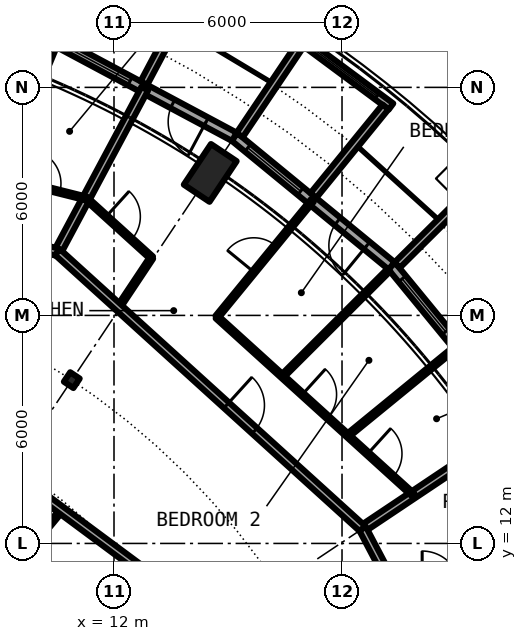
"""IFC4 building model, lengths in metres.
Left out: names, types, materials, properties, quantities, classifications, styles, units other than length and angle.
Written with IfcOpenShell. Run it as: python <this file> out.ifc"""

import sys

from ifc_helpers import new_model, si_unit, direction, frame, frame_2d, origin, origin_2d, place, context, subcontext, project, spatial, rectangle, circle, hollow_circle, i_section, extrude, element, fill, save


model = new_model("IFC4")
c1 = context("Model", 3, precision=1e-05, world=origin(), true_north=direction((0.0, 1.0)))
c2 = subcontext(c1, "Body", "Model", "MODEL_VIEW")
j1 = project(units=[si_unit("LENGTHUNIT", "METRE"), si_unit("PLANEANGLEUNIT", "RADIAN")], contexts=[c1])
p1 = place(None, origin())
s1 = spatial("IfcSite", under=j1, at=p1, CompositionType="ELEMENT")
p2 = place(p1, origin())
s2 = spatial("IfcBuilding", under=s1, at=p2, CompositionType="ELEMENT")
p3 = place(p2, frame((0.0, 0.0, 234.05)))
s3 = spatial("IfcBuildingStorey", under=s2, at=p3, CompositionType="ELEMENT", Elevation=234.05)
p4 = place(p3, frame((14.889, 22.283, 0.0), z_axis=(-0.231777820067, -0.346913947437, 0.908806775502), x_axis=(0.831494710184, -0.555532669549, 0.0)))
e1 = element("IfcColumn", 1, at=p4, inside=s3, PredefinedType="COLUMN", context=c2, shape_type="SweptSolid", body=[
    extrude(hollow_circle(Radius=0.406, WallThickness=0.03, at=origin_2d()), origin(), (0.0, 0.0, 1.0), 3.081),
])
p5 = place(p3, frame((10.889, 16.297, 0.0), z_axis=(0.0, 0.0, 1.0), x_axis=(0.55557023302, 0.831469612303, 0.0)))
e2 = element("IfcColumn", 2, at=p5, inside=s3, PredefinedType="COLUMN", context=c2, shape_type="SweptSolid", body=[
    extrude(i_section(OverallWidth=0.3, OverallDepth=0.3, WebThickness=0.011, FlangeThickness=0.019, FilletRadius=0.027, at=origin_2d()), origin(), (0.0, 0.0, 1.0), 3.05),
])
p6 = place(p3, frame((22.699, 15.167, 0.0), z_axis=(0.0, 0.0, 1.0), x_axis=(-0.634382322723, 0.773019449054, 0.0)))
e3 = element("IfcWall", 3, at=p6, inside=s3, PredefinedType="SOLIDWALL", context=c2, shape_type="SweptSolid", body=[
    extrude(rectangle(XDim=5.352, YDim=0.25, at=frame_2d((2.676, 0.0))), origin(), (0.0, 0.0, 1.0), 2.7),
])
p7 = place(p6, frame((0.841, 0.0, 0.0)))
e4 = element("IfcOpeningElement", 4, at=p7, cuts=e3, PredefinedType="OPENING", context=c2, shape_type="SweptSolid", body=[
    extrude(rectangle(XDim=1.0, YDim=2.2, at=frame_2d((0.5, 1.1))), frame((0.0, 0.135, 0.0), z_axis=(0.0, -1.0, 0.0), x_axis=(1.0, 0.0, 0.0)), (0.0, 0.0, 1.0), 0.27),
])
p8 = place(p6, frame((3.111, 0.0, 0.3)))
e5 = element("IfcOpeningElement", 5, at=p8, cuts=e3, PredefinedType="OPENING", context=c2, shape_type="SweptSolid", body=[
    extrude(rectangle(XDim=1.8, YDim=2.1, at=frame_2d((0.9, 1.05))), frame((0.0, 0.135, 0.0), z_axis=(0.0, -1.0, 0.0), x_axis=(1.0, 0.0, 0.0)), (0.0, 0.0, 1.0), 0.27),
])
p9 = place(p3, frame((19.45, 19.323, -0.03), z_axis=(0.0, 0.0, 1.0), x_axis=(0.709727076896, 0.704476739375, 0.0)))
e6 = element("IfcWall", 6, at=p9, inside=s3, PredefinedType="SOLIDWALL", context=c2, shape_type="SweptSolid", body=[
    extrude(rectangle(XDim=2.883, YDim=0.2, at=frame_2d((1.441, 0.0))), origin(), (0.0, 0.0, 1.0), 2.73),
])
p10 = place(p3, frame((19.304, 19.304, 0.0), z_axis=(0.0, 0.0, 1.0), x_axis=(-0.773019449054, 0.634382322723, 0.0)))
e7 = element("IfcWall", 7, at=p10, inside=s3, PredefinedType="SOLIDWALL", context=c2, shape_type="SweptSolid", body=[
    extrude(rectangle(XDim=5.352, YDim=0.25, at=frame_2d((2.676, 0.0))), origin(), (0.0, 0.0, 1.0), 2.7),
])
p11 = place(p10, frame((0.841, 0.0, 0.0)))
e8 = element("IfcOpeningElement", 8, at=p11, cuts=e7, PredefinedType="OPENING", context=c2, shape_type="SweptSolid", body=[
    extrude(rectangle(XDim=1.0, YDim=2.2, at=frame_2d((0.5, 1.1))), frame((0.0, 0.135, 0.0), z_axis=(0.0, -1.0, 0.0), x_axis=(1.0, 0.0, 0.0)), (0.0, 0.0, 1.0), 0.27),
])
p12 = place(p10, frame((3.096, 0.0, 0.3)))
e9 = element("IfcOpeningElement", 9, at=p12, cuts=e7, PredefinedType="OPENING", context=c2, shape_type="SweptSolid", body=[
    extrude(rectangle(XDim=1.8, YDim=2.1, at=frame_2d((0.9, 1.05))), frame((0.0, 0.135, 0.0), z_axis=(0.0, -1.0, 0.0), x_axis=(1.0, 0.0, 0.0)), (0.0, 0.0, 1.0), 0.27),
])
p13 = place(p3, frame((19.289, 23.496, -0.03), z_axis=(0.0, 0.0, 1.0), x_axis=(-0.803052706508, 0.595908005124, 0.0)))
e10 = element("IfcWall", 10, at=p13, inside=s3, PredefinedType="SOLIDWALL", context=c2, shape_type="SweptSolid", body=[
    extrude(rectangle(XDim=2.994, YDim=0.2, at=frame_2d((1.497, 0.0))), origin(), (0.0, 0.0, 1.0), 2.73),
])
p14 = place(p13, frame((0.457, 0.0, 0.33)))
e11 = element("IfcOpeningElement", 11, at=p14, cuts=e10, PredefinedType="OPENING", context=c2, shape_type="SweptSolid", body=[
    extrude(circle(Radius=1.04, at=frame_2d((1.04, 1.04))), frame((0.0, 0.11, 0.0), z_axis=(0.0, -1.0, 0.0), x_axis=(1.0, 0.0, 0.0)), (0.0, 0.0, 1.0), 0.22),
])
p15 = place(p3, frame((17.246, 21.155, -0.03), z_axis=(0.0, 0.0, 1.0), x_axis=(0.631546363729, 0.775338113639, 0.0)))
e12 = element("IfcWall", 12, at=p15, inside=s3, PredefinedType="SOLIDWALL", context=c2, shape_type="SweptSolid", body=[
    extrude(rectangle(XDim=3.005, YDim=0.2, at=frame_2d((1.502, 0.0))), origin(), (0.0, 0.0, 1.0), 2.73),
])
p16 = place(p3, frame((15.307, 22.746, -0.03), z_axis=(0.0, 0.0, 1.0), x_axis=(0.558583730979, 0.829448139117, 0.0)))
e13 = element("IfcWall", 13, at=p16, inside=s3, PredefinedType="SOLIDWALL", context=c2, shape_type="SweptSolid", body=[
    extrude(rectangle(XDim=2.883, YDim=0.2, at=frame_2d((1.441, 0.0))), origin(), (0.0, 0.0, 1.0), 2.73),
])
p17 = place(p3, frame((15.167, 22.699, 0.0), z_axis=(0.0, 0.0, 1.0), x_axis=(-0.881915646801, 0.471407246368, 0.0)))
e14 = element("IfcWall", 14, at=p17, inside=s3, PredefinedType="SOLIDWALL", context=c2, shape_type="SweptSolid", body=[
    extrude(rectangle(XDim=5.352, YDim=0.25, at=frame_2d((2.676, 0.0))), origin(), (0.0, 0.0, 1.0), 2.7),
])
p18 = place(p17, frame((0.841, 0.0, 0.0)))
e15 = element("IfcOpeningElement", 15, at=p18, cuts=e14, PredefinedType="OPENING", context=c2, shape_type="SweptSolid", body=[
    extrude(rectangle(XDim=1.0, YDim=2.2, at=frame_2d((0.5, 1.1))), frame((0.0, 0.135, 0.0), z_axis=(0.0, -1.0, 0.0), x_axis=(1.0, 0.0, 0.0)), (0.0, 0.0, 1.0), 0.27),
])
p19 = place(p17, frame((3.111, 0.0, 0.3)))
e16 = element("IfcOpeningElement", 16, at=p19, cuts=e14, PredefinedType="OPENING", context=c2, shape_type="SweptSolid", body=[
    extrude(rectangle(XDim=1.8, YDim=2.1, at=frame_2d((0.9, 1.05))), frame((0.0, 0.135, 0.0), z_axis=(0.0, -1.0, 0.0), x_axis=(1.0, 0.0, 0.0)), (0.0, 0.0, 1.0), 0.27),
])
p20 = place(p3, frame((12.787, 24.113, -0.03), z_axis=(0.0, 0.0, 1.0), x_axis=(0.468365282436, 0.883534924159, 0.0)))
e17 = element("IfcWall", 17, at=p20, inside=s3, PredefinedType="SOLIDWALL", context=c2, shape_type="SweptSolid", body=[
    extrude(rectangle(XDim=3.006, YDim=0.2, at=frame_2d((1.503, 0.0))), origin(), (0.0, 0.0, 1.0), 2.73),
])
p21 = place(p3, frame((4.912, 5.955, 0.0), z_axis=(0.0, 0.0, 1.0), x_axis=(0.636045954217, 0.771651180342, 0.0)))
e18 = element("IfcWall", 18, at=p21, inside=s3, PredefinedType="PARTITIONING", context=c2, shape_type="SweptSolid", body=[
    extrude(rectangle(XDim=8.968, YDim=0.1, at=frame_2d((4.484, 0.0))), origin(), (0.0, 0.0, 1.0), 2.7),
])
p22 = place(p21, frame((6.401, 0.0, 0.0)))
e19 = element("IfcOpeningElement", 19, at=p22, cuts=e18, PredefinedType="OPENING", context=c2, shape_type="SweptSolid", body=[
    extrude(rectangle(XDim=0.9, YDim=2.3, at=frame_2d((0.45, 1.15))), frame((0.0, 0.06, 0.0), z_axis=(0.0, -1.0, 0.0), x_axis=(1.0, 0.0, 0.0)), (0.0, 0.0, 1.0), 0.12),
])
p23 = place(p21, frame((1.917, 0.0, 0.0)))
e20 = element("IfcOpeningElement", 20, at=p23, cuts=e18, PredefinedType="OPENING", context=c2, shape_type="SweptSolid", body=[
    extrude(rectangle(XDim=0.9, YDim=2.3, at=frame_2d((0.45, 1.15))), frame((0.0, 0.06, 0.0), z_axis=(0.0, -1.0, 0.0), x_axis=(1.0, 0.0, 0.0)), (0.0, 0.0, 1.0), 0.12),
])
p24 = place(p3, frame((9.013, 21.642, 0.0), z_axis=(0.0, 0.0, 1.0), x_axis=(0.384420204655, 0.923158223845, 0.0)))
e21 = element("IfcWall", 21, at=p24, inside=s3, PredefinedType="PARTITIONING", context=c2, shape_type="SweptSolid", body=[
    extrude(rectangle(XDim=3.73, YDim=0.1, at=frame_2d((1.865, 0.0))), origin(), (0.0, 0.0, 1.0), 2.7),
])
p25 = place(p3, frame((10.512, 19.667, 0.0), z_axis=(0.0, 0.0, 1.0), x_axis=(0.471271812246, 0.881988026553, 0.0)))
e22 = element("IfcWall", 22, at=p25, inside=s3, PredefinedType="PARTITIONING", context=c2, shape_type="SweptSolid", body=[
    extrude(rectangle(XDim=4.874, YDim=0.2, at=frame_2d((2.437, 0.0))), origin(), (0.0, 0.0, 1.0), 2.7),
])
p26 = place(p3, frame((12.118, 18.211, 0.0), z_axis=(0.0, 0.0, 1.0), x_axis=(0.554125989098, 0.832432813028, 0.0)))
e23 = element("IfcWall", 23, at=p26, inside=s3, PredefinedType="PARTITIONING", context=c2, shape_type="SweptSolid", body=[
    extrude(rectangle(XDim=1.57, YDim=0.1, at=frame_2d((0.785, 0.0))), origin(), (0.0, 0.0, 1.0), 2.7),
])
p27 = place(p3, frame((14.709, 17.958, 0.0), z_axis=(0.0, 0.0, 1.0), x_axis=(0.633590098448, 0.773668913133, 0.0)))
e24 = element("IfcWall", 24, at=p27, inside=s3, PredefinedType="PARTITIONING", context=c2, shape_type="SweptSolid", body=[
    extrude(rectangle(XDim=3.962, YDim=0.1, at=frame_2d((1.981, 0.0))), origin(), (0.0, 0.0, 1.0), 2.7),
])
p28 = place(p27, frame((1.531, 0.0, 0.0)))
e25 = element("IfcOpeningElement", 25, at=p28, cuts=e24, PredefinedType="OPENING", context=c2, shape_type="SweptSolid", body=[
    extrude(rectangle(XDim=0.9, YDim=2.3, at=frame_2d((0.45, 1.15))), frame((0.0, 0.06, 0.0), z_axis=(0.0, -1.0, 0.0), x_axis=(1.0, 0.0, 0.0)), (0.0, 0.0, 1.0), 0.12),
])
p29 = place(p3, frame((16.43, 16.398, 0.0), z_axis=(0.0, 0.0, 1.0), x_axis=(0.707722727509, 0.706490297858, 0.0)))
e26 = element("IfcWall", 26, at=p29, inside=s3, PredefinedType="PARTITIONING", context=c2, shape_type="SweptSolid", body=[
    extrude(rectangle(XDim=3.962, YDim=0.1, at=frame_2d((1.981, 0.0))), origin(), (0.0, 0.0, 1.0), 2.7),
])
p30 = place(p3, frame((18.151, 14.838, 0.0), z_axis=(0.0, 0.0, 1.0), x_axis=(0.774321581607, 0.63279229472, 0.0)))
e27 = element("IfcWall", 27, at=p30, inside=s3, PredefinedType="PARTITIONING", context=c2, shape_type="SweptSolid", body=[
    extrude(rectangle(XDim=3.731, YDim=0.1, at=frame_2d((1.866, 0.0))), origin(), (0.0, 0.0, 1.0), 2.7),
])
p31 = place(p3, frame((18.542, 12.389, 0.0), z_axis=(0.0, 0.0, 1.0), x_axis=(0.831340764735, 0.555763018642, 0.0)))
e28 = element("IfcWall", 28, at=p31, inside=s3, PredefinedType="PARTITIONING", context=c2, shape_type="SweptSolid", body=[
    extrude(rectangle(XDim=3.073, YDim=0.2, at=frame_2d((1.537, 0.0))), origin(), (0.0, 0.0, 1.0), 2.7),
])
p32 = place(p3, frame((5.137, 16.938, 0.0), z_axis=(0.0, 0.0, 1.0), x_axis=(0.803229232922, -0.595670042371, 0.0)))
e29 = element("IfcWall", 29, at=p32, inside=s3, PredefinedType="PARTITIONING", context=c2, shape_type="SweptSolid", body=[
    extrude(rectangle(XDim=10.224, YDim=0.2, at=frame_2d((5.112, 0.0))), origin(), (0.0, 0.0, 1.0), 2.7),
])
p33 = place(p32, frame((4.612, 0.0, 0.0)))
e30 = element("IfcOpeningElement", 30, at=p33, cuts=e29, PredefinedType="OPENING", context=c2, shape_type="SweptSolid", body=[
    extrude(rectangle(XDim=1.0, YDim=2.3, at=frame_2d((0.5, 1.15))), frame((0.0, 0.11, 0.0), z_axis=(0.0, -1.0, 0.0), x_axis=(1.0, 0.0, 0.0)), (0.0, 0.0, 1.0), 0.22),
])
p34 = place(p3, frame((0.0, 22.3, 0.0), z_axis=(0.0, 0.0, 1.0), x_axis=(0.969975381822, -0.243203122222, 0.0)))
e31 = element("IfcWall", 31, at=p34, inside=s3, PredefinedType="PARTITIONING", context=c2, shape_type="SweptSolid", body=[
    extrude(rectangle(XDim=10.843, YDim=0.2, at=frame_2d((5.421, 0.0))), origin(), (0.0, 0.0, 1.0), 2.7),
])
p35 = place(p34, frame((6.002, 0.0, 0.0)))
e32 = element("IfcOpeningElement", 32, at=p35, cuts=e31, PredefinedType="OPENING", context=c2, shape_type="SweptSolid", body=[
    extrude(rectangle(XDim=1.0, YDim=2.3, at=frame_2d((0.5, 1.15))), frame((0.0, 0.11, 0.0), z_axis=(0.0, -1.0, 0.0), x_axis=(1.0, 0.0, 0.0)), (0.0, 0.0, 1.0), 0.22),
])
p36 = place(p3, frame((10.512, 19.667, 0.0), z_axis=(0.0, 0.0, 1.0), x_axis=(0.740849323054, -0.67167125927, 0.0)))
e33 = element("IfcWall", 33, at=p36, inside=s3, PredefinedType="PARTITIONING", context=c2, shape_type="SweptSolid", body=[
    extrude(rectangle(XDim=10.842, YDim=0.2, at=frame_2d((5.421, 0.0))), origin(), (0.0, 0.0, 1.0), 2.7),
])
p37 = place(p36, frame((6.003, 0.0, 0.0)))
e34 = element("IfcOpeningElement", 34, at=p37, cuts=e33, PredefinedType="OPENING", context=c2, shape_type="SweptSolid", body=[
    extrude(rectangle(XDim=1.0, YDim=2.3, at=frame_2d((0.5, 1.15))), frame((0.0, 0.11, 0.0), z_axis=(0.0, -1.0, 0.0), x_axis=(1.0, 0.0, 0.0)), (0.0, 0.0, 1.0), 0.22),
])
p38 = place(p3, frame((18.542, 12.389, 0.0), z_axis=(0.0, 0.0, 1.0), x_axis=(0.465812036273, -0.88488369115, 0.0)))
e35 = element("IfcWall", 35, at=p38, inside=s3, PredefinedType="PARTITIONING", context=c2, shape_type="SweptSolid", body=[
    extrude(rectangle(XDim=1.687, YDim=0.2, at=frame_2d((0.844, 0.0))), origin(), (0.0, 0.0, 1.0), 2.7),
])
p39 = place(p3, frame((4.507, 22.771, 0.0), z_axis=(0.0, 0.0, 1.0), x_axis=(0.970020829306, -0.243021790611, 0.0)))
e36 = element("IfcWall", 36, at=p39, inside=s3, PredefinedType="PARTITIONING", context=c2, shape_type="SweptSolid", body=[
    extrude(rectangle(XDim=6.971, YDim=0.1, at=frame_2d((3.485, 0.0))), origin(), (0.0, 0.0, 1.0), 2.7),
])
p40 = place(p39, frame((3.031, 0.0, 0.0)))
e37 = element("IfcOpeningElement", 37, at=p40, cuts=e36, PredefinedType="OPENING", context=c2, shape_type="SweptSolid", body=[
    extrude(rectangle(XDim=0.9, YDim=2.3, at=frame_2d((0.45, 1.15))), frame((0.0, 0.06, 0.0), z_axis=(0.0, -1.0, 0.0), x_axis=(1.0, 0.0, 0.0)), (0.0, 0.0, 1.0), 0.12),
])
p41 = place(p39, frame((5.358, 0.0, 0.0)))
e38 = element("IfcOpeningElement", 38, at=p41, cuts=e36, PredefinedType="OPENING", context=c2, shape_type="SweptSolid", body=[
    extrude(rectangle(XDim=0.9, YDim=2.3, at=frame_2d((0.45, 1.15))), frame((0.0, 0.06, 0.0), z_axis=(0.0, -1.0, 0.0), x_axis=(1.0, 0.0, 0.0)), (0.0, 0.0, 1.0), 0.12),
])
p42 = place(p3, frame((11.271, 21.074, 0.0), z_axis=(0.0, 0.0, 1.0), x_axis=(0.74087097024, -0.671647381783, 0.0)))
e39 = element("IfcWall", 39, at=p42, inside=s3, PredefinedType="PARTITIONING", context=c2, shape_type="SweptSolid", body=[
    extrude(rectangle(XDim=2.324, YDim=0.1, at=frame_2d((1.162, 0.0))), origin(), (0.0, 0.0, 1.0), 2.7),
])
p43 = place(p42, frame((0.705, 0.0, 0.0)))
e40 = element("IfcOpeningElement", 40, at=p43, cuts=e39, PredefinedType="OPENING", context=c2, shape_type="SweptSolid", body=[
    extrude(rectangle(XDim=0.9, YDim=2.3, at=frame_2d((0.45, 1.15))), frame((0.0, 0.06, 0.0), z_axis=(0.0, -1.0, 0.0), x_axis=(1.0, 0.0, 0.0)), (0.0, 0.0, 1.0), 0.12),
])
p44 = place(p3, frame((14.709, 17.958, 0.0), z_axis=(0.0, 0.0, 1.0), x_axis=(0.740923753351, -0.671589153962, 0.0)))
e41 = element("IfcWall", 41, at=p44, inside=s3, PredefinedType="PARTITIONING", context=c2, shape_type="SweptSolid", body=[
    extrude(rectangle(XDim=6.969, YDim=0.1, at=frame_2d((3.484, 0.0))), origin(), (0.0, 0.0, 1.0), 2.7),
])
p45 = place(p44, frame((3.034, 0.0, 0.0)))
e42 = element("IfcOpeningElement", 42, at=p45, cuts=e41, PredefinedType="OPENING", context=c2, shape_type="SweptSolid", body=[
    extrude(rectangle(XDim=0.9, YDim=2.3, at=frame_2d((0.45, 1.15))), frame((0.0, 0.06, 0.0), z_axis=(0.0, -1.0, 0.0), x_axis=(1.0, 0.0, 0.0)), (0.0, 0.0, 1.0), 0.12),
])
p46 = place(p44, frame((5.357, 0.0, 0.0)))
e43 = element("IfcOpeningElement", 43, at=p46, cuts=e41, PredefinedType="OPENING", context=c2, shape_type="SweptSolid", body=[
    extrude(rectangle(XDim=0.9, YDim=2.3, at=frame_2d((0.45, 1.15))), frame((0.0, 0.06, 0.0), z_axis=(0.0, -1.0, 0.0), x_axis=(1.0, 0.0, 0.0)), (0.0, 0.0, 1.0), 0.12),
])
p47 = place(p8, origin())
e44 = element("IfcWindow", 44, at=p47, inside=s3, PartitioningType="SINGLE_PANEL", PredefinedType="WINDOW", context=c2, shape_type="SweptSolid", body=[
    extrude(rectangle(XDim=1.8, YDim=2.1, at=frame_2d((0.9, 1.05))), frame((0.0, 0.03, 0.0), z_axis=(0.0, -1.0, 0.0), x_axis=(1.0, 0.0, 0.0)), (0.0, 0.0, 1.0), 0.06),
])
fill(e5, e44)
p48 = place(p11, origin())
e45 = element("IfcDoor", 45, at=p48, inside=s3, OperationType="SINGLE_SWING_LEFT", PredefinedType="DOOR", context=c2, shape_type="SweptSolid", body=[
    extrude(rectangle(XDim=1.0, YDim=2.2, at=frame_2d((0.5, 1.1))), frame((0.0, 0.025, 0.0), z_axis=(0.0, -1.0, 0.0), x_axis=(1.0, 0.0, 0.0)), (0.0, 0.0, 1.0), 0.05),
])
fill(e8, e45)
p49 = place(p12, origin())
e46 = element("IfcWindow", 46, at=p49, inside=s3, PartitioningType="SINGLE_PANEL", PredefinedType="WINDOW", context=c2, shape_type="SweptSolid", body=[
    extrude(rectangle(XDim=1.8, YDim=2.1, at=frame_2d((0.9, 1.05))), frame((0.0, 0.03, 0.0), z_axis=(0.0, -1.0, 0.0), x_axis=(1.0, 0.0, 0.0)), (0.0, 0.0, 1.0), 0.06),
])
fill(e9, e46)
p50 = place(p14, origin())
e47 = element("IfcWindow", 47, at=p50, inside=s3, PartitioningType="SINGLE_PANEL", PredefinedType="WINDOW", context=c2, shape_type="SweptSolid", body=[
    extrude(circle(Radius=1.04, at=frame_2d((1.04, 1.04))), frame((0.0, 0.03, 0.0), z_axis=(0.0, -1.0, 0.0), x_axis=(1.0, 0.0, 0.0)), (0.0, 0.0, 1.0), 0.06),
])
fill(e11, e47)
p51 = place(p18, origin())
e48 = element("IfcDoor", 48, at=p51, inside=s3, OperationType="SINGLE_SWING_LEFT", PredefinedType="DOOR", context=c2, shape_type="SweptSolid", body=[
    extrude(rectangle(XDim=1.0, YDim=2.2, at=frame_2d((0.5, 1.1))), frame((0.0, 0.025, 0.0), z_axis=(0.0, -1.0, 0.0), x_axis=(1.0, 0.0, 0.0)), (0.0, 0.0, 1.0), 0.05),
])
fill(e15, e48)
p52 = place(p19, origin())
e49 = element("IfcWindow", 49, at=p52, inside=s3, PartitioningType="SINGLE_PANEL", PredefinedType="WINDOW", context=c2, shape_type="SweptSolid", body=[
    extrude(rectangle(XDim=1.8, YDim=2.1, at=frame_2d((0.9, 1.05))), frame((0.0, 0.03, 0.0), z_axis=(0.0, -1.0, 0.0), x_axis=(1.0, 0.0, 0.0)), (0.0, 0.0, 1.0), 0.06),
])
fill(e16, e49)
p53 = place(p37, origin())
e50 = element("IfcDoor", 50, at=p53, inside=s3, OperationType="SINGLE_SWING_RIGHT", PredefinedType="DOOR", context=c2, shape_type="SweptSolid", body=[
    extrude(rectangle(XDim=1.0, YDim=2.3, at=frame_2d((0.5, 1.15))), frame((0.0, 0.025, 0.0), z_axis=(0.0, -1.0, 0.0), x_axis=(1.0, 0.0, 0.0)), (0.0, 0.0, 1.0), 0.05),
])
fill(e34, e50)
p54 = place(p43, origin())
e51 = element("IfcDoor", 51, at=p54, inside=s3, OperationType="SINGLE_SWING_LEFT", PredefinedType="DOOR", context=c2, shape_type="SweptSolid", body=[
    extrude(rectangle(XDim=0.9, YDim=2.3, at=frame_2d((0.45, 1.15))), frame((0.0, 0.025, 0.0), z_axis=(0.0, -1.0, 0.0), x_axis=(1.0, 0.0, 0.0)), (0.0, 0.0, 1.0), 0.05),
])
fill(e40, e51)
p55 = place(p28, origin())
e52 = element("IfcDoor", 52, at=p55, inside=s3, OperationType="SINGLE_SWING_RIGHT", PredefinedType="DOOR", context=c2, shape_type="SweptSolid", body=[
    extrude(rectangle(XDim=0.9, YDim=2.3, at=frame_2d((0.45, 1.15))), frame((0.0, 0.025, 0.0), z_axis=(0.0, -1.0, 0.0), x_axis=(1.0, 0.0, 0.0)), (0.0, 0.0, 1.0), 0.05),
])
fill(e25, e52)
p56 = place(p45, origin())
e53 = element("IfcDoor", 53, at=p56, inside=s3, OperationType="SINGLE_SWING_LEFT", PredefinedType="DOOR", context=c2, shape_type="SweptSolid", body=[
    extrude(rectangle(XDim=0.9, YDim=2.3, at=frame_2d((0.45, 1.15))), frame((0.0, 0.025, 0.0), z_axis=(0.0, -1.0, 0.0), x_axis=(1.0, 0.0, 0.0)), (0.0, 0.0, 1.0), 0.05),
])
fill(e42, e53)
p57 = place(p46, origin())
e54 = element("IfcDoor", 54, at=p57, inside=s3, OperationType="SINGLE_SWING_RIGHT", PredefinedType="DOOR", context=c2, shape_type="SweptSolid", body=[
    extrude(rectangle(XDim=0.9, YDim=2.3, at=frame_2d((0.45, 1.15))), frame((0.0, 0.025, 0.0), z_axis=(0.0, -1.0, 0.0), x_axis=(1.0, 0.0, 0.0)), (0.0, 0.0, 1.0), 0.05),
])
fill(e43, e54)
p58 = place(p41, origin())
e55 = element("IfcDoor", 55, at=p58, inside=s3, OperationType="SINGLE_SWING_RIGHT", PredefinedType="DOOR", context=c2, shape_type="SweptSolid", body=[
    extrude(rectangle(XDim=0.9, YDim=2.3, at=frame_2d((0.45, 1.15))), frame((0.0, 0.025, 0.0), z_axis=(0.0, -1.0, 0.0), x_axis=(1.0, 0.0, 0.0)), (0.0, 0.0, 1.0), 0.05),
])
fill(e38, e55)
save(model, sys.argv[1])
